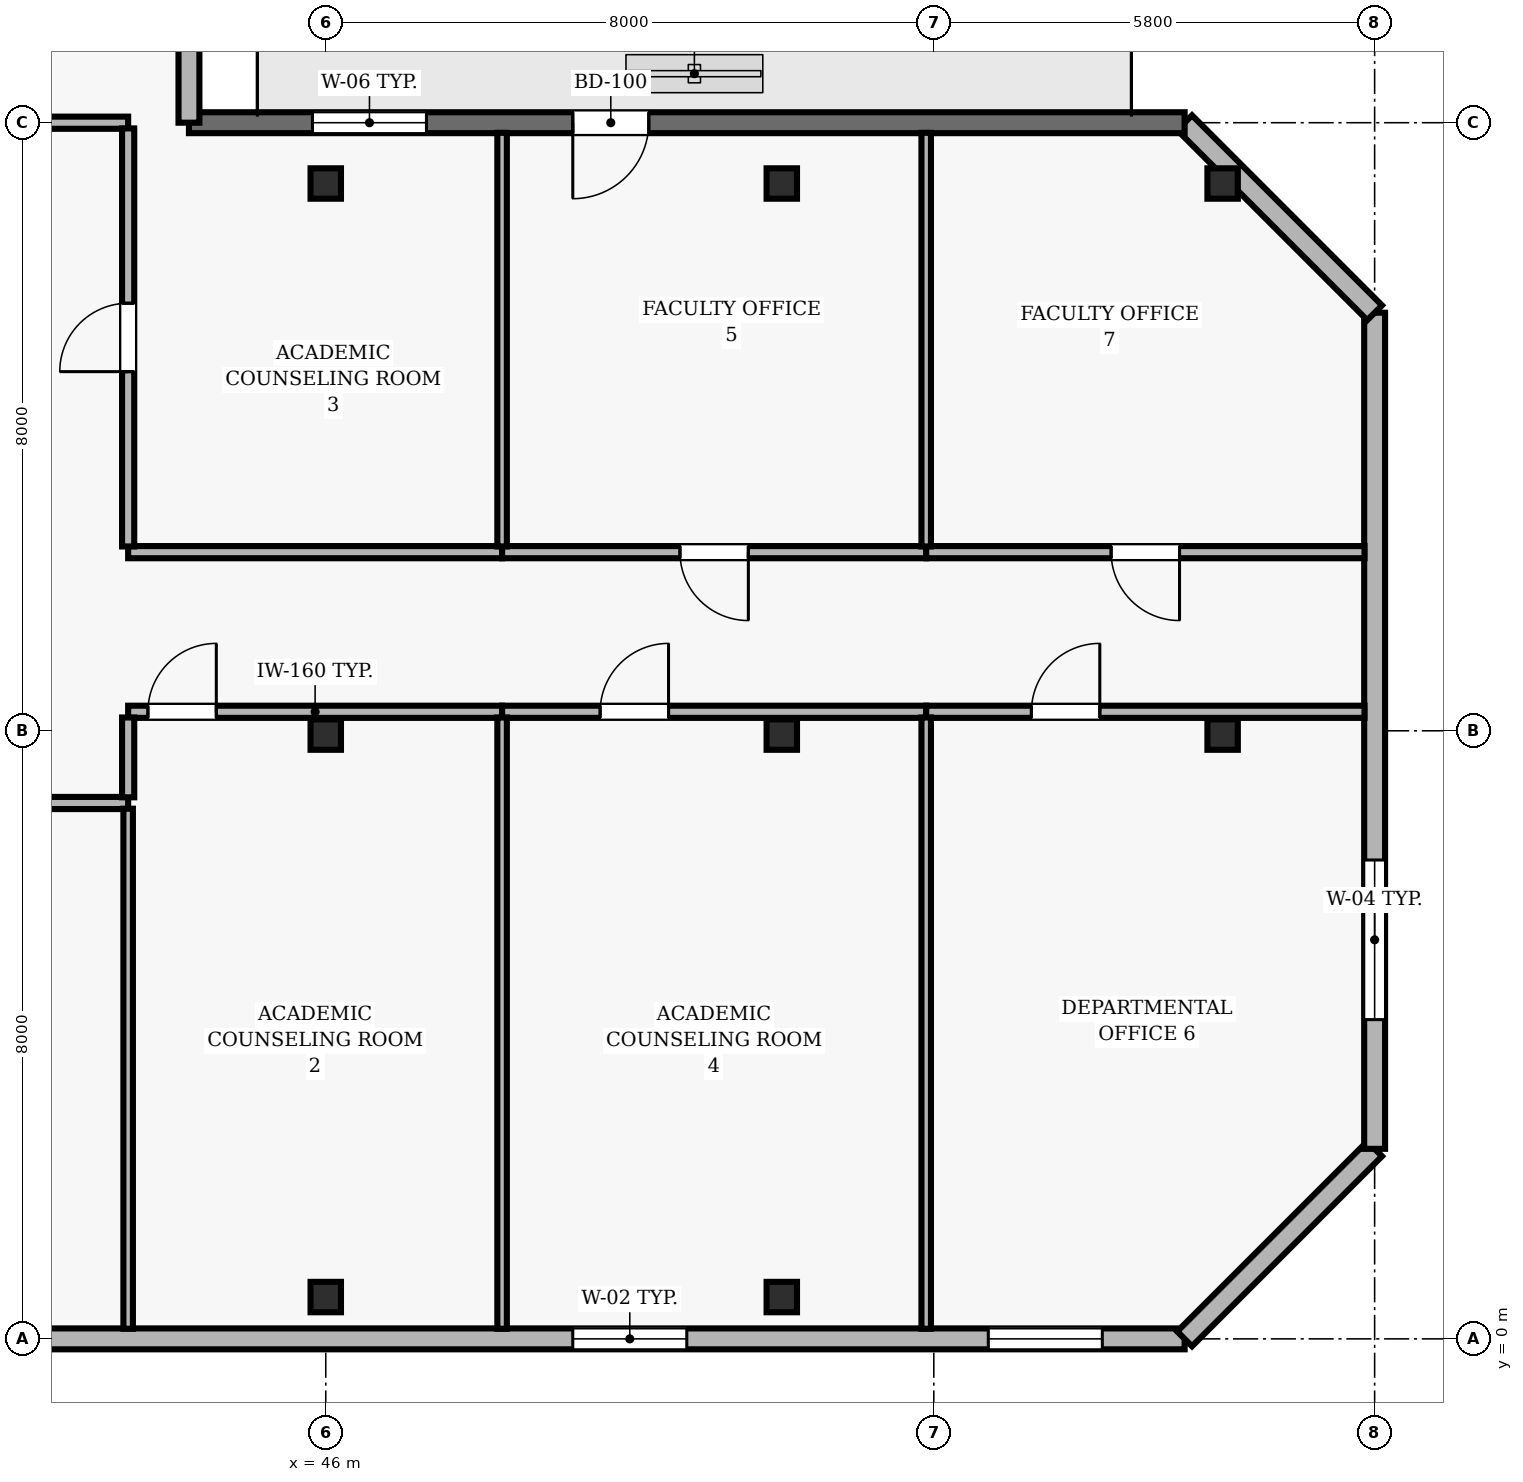
"""IFC4 building model, lengths in metres.
Left out: names, types, materials, properties, quantities, classifications, styles, units other than length and angle.
Written with IfcOpenShell. Run it as: python <this file> out.ifc"""

import sys

from ifc_helpers import new_model, si_unit, direction, frame, frame_2d, origin, origin_2d, place, context, subcontext, project, spatial, rectangle, hollow_rectangle, extrude, element, fill, save


model = new_model("IFC4")
c1 = context("Model", 3, precision=1e-05, world=origin(), true_north=direction((0.0, 1.0)))
c2 = subcontext(c1, "Body", "Model", "MODEL_VIEW")
j1 = project(units=[si_unit("LENGTHUNIT", "METRE"), si_unit("PLANEANGLEUNIT", "RADIAN")], contexts=[c1])
p1 = place(None, origin())
s1 = spatial("IfcSite", under=j1, at=p1, CompositionType="ELEMENT")
p2 = place(p1, origin())
s2 = spatial("IfcBuilding", under=s1, at=p2, CompositionType="ELEMENT")
p3 = place(p2, frame((0.0, 0.0, 298.9)))
s3 = spatial("IfcBuildingStorey", under=s2, at=p3, CompositionType="ELEMENT", Elevation=298.9)
for number, where, z_axis, x_axis in (
    (1, (46.0, 0.55, 0.0), (0.0, 0.0, 1.0), (1.0, 0.0, 0.0)),
    (2, (46.0, 7.95, 0.0), (0.0, 0.0, 1.0), (1.0, 0.0, 0.0)),
    (3, (46.0, 15.2, 0.0), (0.0, 0.0, 1.0), (1.0, 0.0, 0.0)),
    (4, (52.0, 0.55, 0.0), (0.0, 0.0, 1.0), (1.0, 0.0, 0.0)),
    (5, (52.0, 7.95, 0.0), (0.0, 0.0, 1.0), (1.0, 0.0, 0.0)),
    (6, (52.0, 15.2, 0.0), (0.0, 0.0, 1.0), (1.0, 0.0, 0.0)),
    (7, (57.8, 7.95, 0.0), (0.0, 0.0, 1.0), (1.0, 0.0, 0.0)),
    (8, (57.8, 15.2, 0.0), (0.0, 0.0, 1.0), (1.0, 0.0, 0.0)),
):
    element("IfcColumn", number, at=place(p3, frame(where, z_axis=z_axis, x_axis=x_axis)), inside=s3, PredefinedType="COLUMN", context=c2, shape_type="SweptSolid", body=[
        extrude(hollow_rectangle(XDim=0.4, YDim=0.4, WallThickness=0.02, at=origin_2d()), origin(), (0.0, 0.0, 1.0), 3.9),
    ])
p4 = place(p3, frame((24.5, 0.0, 0.0), z_axis=(0.0, 0.0, 1.0), x_axis=(1.0, 0.0, 0.0)))
e9 = element("IfcWall", 9, at=p4, inside=s3, PredefinedType="SOLIDWALL", context=c2, shape_type="SweptSolid", body=[
    extrude(rectangle(XDim=32.8, YDim=0.275, at=frame_2d((16.4, 0.0))), origin(), (0.0, 0.0, 1.0), 3.69),
])
p5 = place(p4, frame((1.983, 0.0, 0.9)))
e10 = element("IfcOpeningElement", 10, at=p5, cuts=e9, PredefinedType="OPENING", context=c2, shape_type="SweptSolid", body=[
    extrude(rectangle(XDim=1.5, YDim=1.6, at=frame_2d((0.75, 0.8))), frame((0.0, 0.147, 0.0), z_axis=(0.0, -1.0, 0.0), x_axis=(1.0, 0.0, 0.0)), (0.0, 0.0, 1.0), 0.295),
])
p6 = place(p4, frame((8.35, 0.0, 0.9)))
e11 = element("IfcOpeningElement", 11, at=p6, cuts=e9, PredefinedType="OPENING", context=c2, shape_type="SweptSolid", body=[
    extrude(rectangle(XDim=1.5, YDim=1.6, at=frame_2d((0.75, 0.8))), frame((0.0, 0.147, 0.0), z_axis=(0.0, -1.0, 0.0), x_axis=(1.0, 0.0, 0.0)), (0.0, 0.0, 1.0), 0.295),
])
p7 = place(p4, frame((24.75, 0.0, 0.9)))
e12 = element("IfcOpeningElement", 12, at=p7, cuts=e9, PredefinedType="OPENING", context=c2, shape_type="SweptSolid", body=[
    extrude(rectangle(XDim=1.5, YDim=1.6, at=frame_2d((0.75, 0.8))), frame((0.0, 0.147, 0.0), z_axis=(0.0, -1.0, 0.0), x_axis=(1.0, 0.0, 0.0)), (0.0, 0.0, 1.0), 0.295),
])
p8 = place(p4, frame((30.217, 0.0, 0.9)))
e13 = element("IfcOpeningElement", 13, at=p8, cuts=e9, PredefinedType="OPENING", context=c2, shape_type="SweptSolid", body=[
    extrude(rectangle(XDim=1.5, YDim=1.6, at=frame_2d((0.75, 0.8))), frame((0.0, 0.147, 0.0), z_axis=(0.0, -1.0, 0.0), x_axis=(1.0, 0.0, 0.0)), (0.0, 0.0, 1.0), 0.295),
])
p9 = place(p3, frame((57.3, 0.0, 0.0), z_axis=(0.0, 0.0, 1.0), x_axis=(0.707106781187, 0.707106781187, 0.0)))
e14 = element("IfcWall", 14, at=p9, inside=s3, PredefinedType="SOLIDWALL", context=c2, shape_type="SweptSolid", body=[
    extrude(rectangle(XDim=3.536, YDim=0.275, at=frame_2d((1.768, 0.0))), origin(), (0.0, 0.0, 1.0), 3.69),
])
p10 = place(p3, frame((59.8, 2.5, 0.0), z_axis=(0.0, 0.0, 1.0), x_axis=(0.0, 1.0, 0.0)))
e15 = element("IfcWall", 15, at=p10, inside=s3, PredefinedType="SOLIDWALL", context=c2, shape_type="SweptSolid", body=[
    extrude(rectangle(XDim=11.0, YDim=0.275, at=frame_2d((5.5, 0.0))), origin(), (0.0, 0.0, 1.0), 3.69),
])
p11 = place(p10, frame((1.7, 0.0, 0.9)))
e16 = element("IfcOpeningElement", 16, at=p11, cuts=e15, PredefinedType="OPENING", context=c2, shape_type="SweptSolid", body=[
    extrude(rectangle(XDim=2.1, YDim=1.6, at=frame_2d((1.05, 0.8))), frame((0.0, 0.147, 0.0), z_axis=(0.0, -1.0, 0.0), x_axis=(1.0, 0.0, 0.0)), (0.0, 0.0, 1.0), 0.295),
])
p12 = place(p3, frame((59.8, 13.5, 0.0), z_axis=(0.0, 0.0, 1.0), x_axis=(-0.707106781187, 0.707106781187, 0.0)))
e17 = element("IfcWall", 17, at=p12, inside=s3, PredefinedType="SOLIDWALL", context=c2, shape_type="SweptSolid", body=[
    extrude(rectangle(XDim=3.536, YDim=0.275, at=frame_2d((1.768, 0.0))), origin(), (0.0, 0.0, 1.0), 3.69),
])
p13 = place(p3, frame((57.3, 16.0, 0.0), z_axis=(0.0, 0.0, 1.0), x_axis=(-1.0, 0.0, 0.0)))
e18 = element("IfcWall", 18, at=p13, inside=s3, PredefinedType="SOLIDWALL", context=c2, shape_type="SweptSolid", body=[
    extrude(rectangle(XDim=13.1, YDim=0.275, at=frame_2d((6.55, 0.0))), origin(), (0.0, 0.0, 1.0), 3.69),
])
p14 = place(p13, frame((7.05, 0.0, 0.0)))
e19 = element("IfcOpeningElement", 19, at=p14, cuts=e18, PredefinedType="OPENING", context=c2, shape_type="SweptSolid", body=[
    extrude(rectangle(XDim=1.0, YDim=2.2, at=frame_2d((0.5, 1.1))), frame((0.0, 0.147, 0.0), z_axis=(0.0, -1.0, 0.0), x_axis=(1.0, 0.0, 0.0)), (0.0, 0.0, 1.0), 0.295),
])
p15 = place(p13, frame((9.975, 0.0, 0.9)))
e20 = element("IfcOpeningElement", 20, at=p15, cuts=e18, PredefinedType="OPENING", context=c2, shape_type="SweptSolid", body=[
    extrude(rectangle(XDim=1.5, YDim=1.8, at=frame_2d((0.75, 0.9))), frame((0.0, 0.147, 0.0), z_axis=(0.0, -1.0, 0.0), x_axis=(1.0, 0.0, 0.0)), (0.0, 0.0, 1.0), 0.295),
])
p16 = place(p3, frame((44.2, 16.0, 0.0), z_axis=(0.0, 0.0, 1.0), x_axis=(0.0, 1.0, 0.0)))
e21 = element("IfcWall", 21, at=p16, inside=s3, PredefinedType="SOLIDWALL", context=c2, shape_type="SweptSolid", body=[
    extrude(rectangle(XDim=4.4, YDim=0.275, at=frame_2d((2.2, 0.0))), origin(), (0.0, 0.0, 1.0), 3.69),
])
p17 = place(p3, frame((38.05, 7.05, 0.0), z_axis=(0.0, 0.0, 1.0), x_axis=(1.0, 0.0, 0.0)))
e22 = element("IfcWall", 22, at=p17, inside=s3, PredefinedType="PARTITIONING", context=c2, shape_type="SweptSolid", body=[
    extrude(rectangle(XDim=5.35, YDim=0.16, at=frame_2d((2.675, 0.0))), origin(), (0.0, 0.0, 1.0), 3.69),
])
p18 = place(p17, frame((2.225, 0.0, 0.0)))
e23 = element("IfcOpeningElement", 23, at=p18, cuts=e22, PredefinedType="OPENING", context=c2, shape_type="SweptSolid", body=[
    extrude(rectangle(XDim=0.9, YDim=2.1, at=frame_2d((0.45, 1.05))), frame((0.0, 0.09, 0.0), z_axis=(0.0, -1.0, 0.0), x_axis=(1.0, 0.0, 0.0)), (0.0, 0.0, 1.0), 0.18),
])
p19 = place(p3, frame((43.4, 8.25, 0.0), z_axis=(0.0, 0.0, 1.0), x_axis=(1.0, 0.0, 0.0)))
e24 = element("IfcWall", 24, at=p19, inside=s3, PredefinedType="PARTITIONING", context=c2, shape_type="SweptSolid", body=[
    extrude(rectangle(XDim=4.92, YDim=0.16, at=frame_2d((2.46, 0.0))), origin(), (0.0, 0.0, 1.0), 3.227),
])
p20 = place(p19, frame((0.26, 0.0, 0.0)))
e25 = element("IfcOpeningElement", 25, at=p20, cuts=e24, PredefinedType="OPENING", context=c2, shape_type="SweptSolid", body=[
    extrude(rectangle(XDim=0.9, YDim=2.1, at=frame_2d((0.45, 1.05))), frame((0.0, 0.09, 0.0), z_axis=(0.0, -1.0, 0.0), x_axis=(1.0, 0.0, 0.0)), (0.0, 0.0, 1.0), 0.18),
])
p21 = place(p3, frame((43.4, 16.0, 0.0), z_axis=(0.0, 0.0, 1.0), x_axis=(-1.0, 0.0, 0.0)))
e26 = element("IfcWall", 26, at=p21, inside=s3, PredefinedType="PARTITIONING", context=c2, shape_type="SweptSolid", body=[
    extrude(rectangle(XDim=5.35, YDim=0.16, at=frame_2d((2.675, 0.0))), origin(), (0.0, 0.0, 1.0), 3.39),
])
p22 = place(p21, frame((2.225, 0.0, 0.0)))
e27 = element("IfcOpeningElement", 27, at=p22, cuts=e26, PredefinedType="OPENING", context=c2, shape_type="SweptSolid", body=[
    extrude(rectangle(XDim=0.9, YDim=2.1, at=frame_2d((0.45, 1.05))), frame((0.0, 0.09, 0.0), z_axis=(0.0, -1.0, 0.0), x_axis=(1.0, 0.0, 0.0)), (0.0, 0.0, 1.0), 0.18),
])
p23 = place(p3, frame((48.32, 8.25, 0.0), z_axis=(0.0, 0.0, 1.0), x_axis=(1.0, 0.0, 0.0)))
e28 = element("IfcWall", 28, at=p23, inside=s3, PredefinedType="PARTITIONING", context=c2, shape_type="SweptSolid", body=[
    extrude(rectangle(XDim=5.58, YDim=0.16, at=frame_2d((2.79, 0.0))), origin(), (0.0, 0.0, 1.0), 3.227),
])
p24 = place(p23, frame((1.29, 0.0, 0.0)))
e29 = element("IfcOpeningElement", 29, at=p24, cuts=e28, PredefinedType="OPENING", context=c2, shape_type="SweptSolid", body=[
    extrude(rectangle(XDim=0.9, YDim=2.1, at=frame_2d((0.45, 1.05))), frame((0.0, 0.09, 0.0), z_axis=(0.0, -1.0, 0.0), x_axis=(1.0, 0.0, 0.0)), (0.0, 0.0, 1.0), 0.18),
])
p25 = place(p3, frame((48.32, 10.35, 0.0), z_axis=(0.0, 0.0, 1.0), x_axis=(-1.0, 0.0, 0.0)))
e30 = element("IfcWall", 30, at=p25, inside=s3, PredefinedType="PARTITIONING", context=c2, shape_type="SweptSolid", body=[
    extrude(rectangle(XDim=4.92, YDim=0.16, at=frame_2d((2.46, 0.0))), origin(), (0.0, 0.0, 1.0), 3.424),
])
p26 = place(p3, frame((53.9, 8.25, 0.0), z_axis=(0.0, 0.0, 1.0), x_axis=(1.0, 0.0, 0.0)))
e31 = element("IfcWall", 31, at=p26, inside=s3, PredefinedType="PARTITIONING", context=c2, shape_type="SweptSolid", body=[
    extrude(rectangle(XDim=5.767, YDim=0.16, at=frame_2d((2.884, 0.0))), origin(), (0.0, 0.0, 1.0), 3.227),
])
p27 = place(p26, frame((1.384, 0.0, 0.0)))
e32 = element("IfcOpeningElement", 32, at=p27, cuts=e31, PredefinedType="OPENING", context=c2, shape_type="SweptSolid", body=[
    extrude(rectangle(XDim=0.9, YDim=2.1, at=frame_2d((0.45, 1.05))), frame((0.0, 0.09, 0.0), z_axis=(0.0, -1.0, 0.0), x_axis=(1.0, 0.0, 0.0)), (0.0, 0.0, 1.0), 0.18),
])
p28 = place(p3, frame((53.9, 10.35, 0.0), z_axis=(0.0, 0.0, 1.0), x_axis=(-1.0, 0.0, 0.0)))
e33 = element("IfcWall", 33, at=p28, inside=s3, PredefinedType="PARTITIONING", context=c2, shape_type="SweptSolid", body=[
    extrude(rectangle(XDim=5.58, YDim=0.16, at=frame_2d((2.79, 0.0))), origin(), (0.0, 0.0, 1.0), 3.424),
])
p29 = place(p28, frame((2.34, 0.0, 0.0)))
e34 = element("IfcOpeningElement", 34, at=p29, cuts=e33, PredefinedType="OPENING", context=c2, shape_type="SweptSolid", body=[
    extrude(rectangle(XDim=0.9, YDim=2.1, at=frame_2d((0.45, 1.05))), frame((0.0, 0.09, 0.0), z_axis=(0.0, -1.0, 0.0), x_axis=(1.0, 0.0, 0.0)), (0.0, 0.0, 1.0), 0.18),
])
p30 = place(p3, frame((59.667, 10.35, 0.0), z_axis=(0.0, 0.0, 1.0), x_axis=(-1.0, 0.0, 0.0)))
e35 = element("IfcWall", 35, at=p30, inside=s3, PredefinedType="PARTITIONING", context=c2, shape_type="SweptSolid", body=[
    extrude(rectangle(XDim=5.767, YDim=0.16, at=frame_2d((2.884, 0.0))), origin(), (0.0, 0.0, 1.0), 3.424),
])
p31 = place(p30, frame((2.434, 0.0, 0.0)))
e36 = element("IfcOpeningElement", 36, at=p31, cuts=e35, PredefinedType="OPENING", context=c2, shape_type="SweptSolid", body=[
    extrude(rectangle(XDim=0.9, YDim=2.1, at=frame_2d((0.45, 1.05))), frame((0.0, 0.09, 0.0), z_axis=(0.0, -1.0, 0.0), x_axis=(1.0, 0.0, 0.0)), (0.0, 0.0, 1.0), 0.18),
])
p32 = place(p3, frame((43.4, 0.133, 0.0), z_axis=(0.0, 0.0, 1.0), x_axis=(0.0, 1.0, 0.0)))
e37 = element("IfcWall", 37, at=p32, inside=s3, PredefinedType="PARTITIONING", context=c2, shape_type="SweptSolid", body=[
    extrude(rectangle(XDim=6.842, YDim=0.125, at=frame_2d((3.421, 0.0))), origin(), (0.0, 0.0, 1.0), 3.69),
])
p33 = place(p3, frame((43.4, 7.125, 0.0), z_axis=(0.0, 0.0, 1.0), x_axis=(0.0, 1.0, 0.0)))
e38 = element("IfcWall", 38, at=p33, inside=s3, PredefinedType="PARTITIONING", context=c2, shape_type="SweptSolid", body=[
    extrude(rectangle(XDim=1.05, YDim=0.16, at=frame_2d((0.525, 0.0))), origin(), (0.0, 0.0, 1.0), 3.69),
])
p34 = place(p3, frame((43.4, 10.425, 0.0), z_axis=(0.0, 0.0, 1.0), x_axis=(0.0, 1.0, 0.0)))
e39 = element("IfcWall", 39, at=p34, inside=s3, PredefinedType="PARTITIONING", context=c2, shape_type="SweptSolid", body=[
    extrude(rectangle(XDim=5.5, YDim=0.16, at=frame_2d((2.75, 0.0))), origin(), (0.0, 0.0, 1.0), 3.69),
])
p35 = place(p34, frame((2.3, 0.0, 0.0)))
e40 = element("IfcOpeningElement", 40, at=p35, cuts=e39, PredefinedType="OPENING", context=c2, shape_type="SweptSolid", body=[
    extrude(rectangle(XDim=0.9, YDim=2.1, at=frame_2d((0.45, 1.05))), frame((0.0, 0.09, 0.0), z_axis=(0.0, -1.0, 0.0), x_axis=(1.0, 0.0, 0.0)), (0.0, 0.0, 1.0), 0.18),
])
p36 = place(p3, frame((48.32, 0.133, 0.0), z_axis=(0.0, 0.0, 1.0), x_axis=(0.0, 1.0, 0.0)))
e41 = element("IfcWall", 41, at=p36, inside=s3, PredefinedType="PARTITIONING", context=c2, shape_type="SweptSolid", body=[
    extrude(rectangle(XDim=8.042, YDim=0.125, at=frame_2d((4.021, 0.0))), origin(), (0.0, 0.0, 1.0), 3.69),
])
p37 = place(p3, frame((48.32, 10.425, 0.0), z_axis=(0.0, 0.0, 1.0), x_axis=(0.0, 1.0, 0.0)))
e42 = element("IfcWall", 42, at=p37, inside=s3, PredefinedType="PARTITIONING", context=c2, shape_type="SweptSolid", body=[
    extrude(rectangle(XDim=5.442, YDim=0.125, at=frame_2d((2.721, 0.0))), origin(), (0.0, 0.0, 1.0), 3.69),
])
p38 = place(p3, frame((53.9, 0.133, 0.0), z_axis=(0.0, 0.0, 1.0), x_axis=(0.0, 1.0, 0.0)))
e43 = element("IfcWall", 43, at=p38, inside=s3, PredefinedType="PARTITIONING", context=c2, shape_type="SweptSolid", body=[
    extrude(rectangle(XDim=8.042, YDim=0.125, at=frame_2d((4.021, 0.0))), origin(), (0.0, 0.0, 1.0), 3.69),
])
p39 = place(p3, frame((53.9, 10.425, 0.0), z_axis=(0.0, 0.0, 1.0), x_axis=(0.0, 1.0, 0.0)))
e44 = element("IfcWall", 44, at=p39, inside=s3, PredefinedType="PARTITIONING", context=c2, shape_type="SweptSolid", body=[
    extrude(rectangle(XDim=5.442, YDim=0.125, at=frame_2d((2.721, 0.0))), origin(), (0.0, 0.0, 1.0), 3.69),
])
p40 = place(p7, origin())
e45 = element("IfcWindow", 45, at=p40, inside=s3, PartitioningType="SINGLE_PANEL", PredefinedType="WINDOW", context=c2, shape_type="SweptSolid", body=[
    extrude(rectangle(XDim=1.5, YDim=1.6, at=frame_2d((0.75, 0.8))), frame((0.0, 0.03, 0.0), z_axis=(0.0, -1.0, 0.0), x_axis=(1.0, 0.0, 0.0)), (0.0, 0.0, 1.0), 0.06),
])
fill(e12, e45)
p41 = place(p8, origin())
e46 = element("IfcWindow", 46, at=p41, inside=s3, PartitioningType="SINGLE_PANEL", PredefinedType="WINDOW", context=c2, shape_type="SweptSolid", body=[
    extrude(rectangle(XDim=1.5, YDim=1.6, at=frame_2d((0.75, 0.8))), frame((0.0, 0.03, 0.0), z_axis=(0.0, -1.0, 0.0), x_axis=(1.0, 0.0, 0.0)), (0.0, 0.0, 1.0), 0.06),
])
fill(e13, e46)
p42 = place(p11, origin())
e47 = element("IfcWindow", 47, at=p42, inside=s3, PartitioningType="SINGLE_PANEL", PredefinedType="WINDOW", context=c2, shape_type="SweptSolid", body=[
    extrude(rectangle(XDim=2.1, YDim=1.6, at=frame_2d((1.05, 0.8))), frame((0.0, 0.03, 0.0), z_axis=(0.0, -1.0, 0.0), x_axis=(1.0, 0.0, 0.0)), (0.0, 0.0, 1.0), 0.06),
])
fill(e16, e47)
p43 = place(p14, origin())
e48 = element("IfcDoor", 48, at=p43, inside=s3, OperationType="SINGLE_SWING_RIGHT", PredefinedType="DOOR", context=c2, shape_type="SweptSolid", body=[
    extrude(rectangle(XDim=1.0, YDim=2.2, at=frame_2d((0.5, 1.1))), frame((0.0, 0.025, 0.0), z_axis=(0.0, -1.0, 0.0), x_axis=(1.0, 0.0, 0.0)), (0.0, 0.0, 1.0), 0.05),
])
fill(e19, e48)
p44 = place(p15, origin())
e49 = element("IfcWindow", 49, at=p44, inside=s3, PartitioningType="SINGLE_PANEL", PredefinedType="WINDOW", context=c2, shape_type="SweptSolid", body=[
    extrude(rectangle(XDim=1.5, YDim=1.8, at=frame_2d((0.75, 0.9))), frame((0.0, 0.03, 0.0), z_axis=(0.0, -1.0, 0.0), x_axis=(1.0, 0.0, 0.0)), (0.0, 0.0, 1.0), 0.06),
])
fill(e20, e49)
p45 = place(p20, origin())
e50 = element("IfcDoor", 50, at=p45, inside=s3, OperationType="SINGLE_SWING_RIGHT", PredefinedType="DOOR", context=c2, shape_type="SweptSolid", body=[
    extrude(rectangle(XDim=0.9, YDim=2.1, at=frame_2d((0.45, 1.05))), frame((0.0, 0.025, 0.0), z_axis=(0.0, -1.0, 0.0), x_axis=(1.0, 0.0, 0.0)), (0.0, 0.0, 1.0), 0.05),
])
fill(e25, e50)
p46 = place(p35, origin())
e51 = element("IfcDoor", 51, at=p46, inside=s3, OperationType="SINGLE_SWING_LEFT", PredefinedType="DOOR", context=c2, shape_type="SweptSolid", body=[
    extrude(rectangle(XDim=0.9, YDim=2.1, at=frame_2d((0.45, 1.05))), frame((0.0, 0.025, 0.0), z_axis=(0.0, -1.0, 0.0), x_axis=(1.0, 0.0, 0.0)), (0.0, 0.0, 1.0), 0.05),
])
fill(e40, e51)
p47 = place(p24, origin())
e52 = element("IfcDoor", 52, at=p47, inside=s3, OperationType="SINGLE_SWING_RIGHT", PredefinedType="DOOR", context=c2, shape_type="SweptSolid", body=[
    extrude(rectangle(XDim=0.9, YDim=2.1, at=frame_2d((0.45, 1.05))), frame((0.0, 0.025, 0.0), z_axis=(0.0, -1.0, 0.0), x_axis=(1.0, 0.0, 0.0)), (0.0, 0.0, 1.0), 0.05),
])
fill(e29, e52)
p48 = place(p29, origin())
e53 = element("IfcDoor", 53, at=p48, inside=s3, OperationType="SINGLE_SWING_LEFT", PredefinedType="DOOR", context=c2, shape_type="SweptSolid", body=[
    extrude(rectangle(XDim=0.9, YDim=2.1, at=frame_2d((0.45, 1.05))), frame((0.0, 0.025, 0.0), z_axis=(0.0, -1.0, 0.0), x_axis=(1.0, 0.0, 0.0)), (0.0, 0.0, 1.0), 0.05),
])
fill(e34, e53)
p49 = place(p27, origin())
e54 = element("IfcDoor", 54, at=p49, inside=s3, OperationType="SINGLE_SWING_RIGHT", PredefinedType="DOOR", context=c2, shape_type="SweptSolid", body=[
    extrude(rectangle(XDim=0.9, YDim=2.1, at=frame_2d((0.45, 1.05))), frame((0.0, 0.025, 0.0), z_axis=(0.0, -1.0, 0.0), x_axis=(1.0, 0.0, 0.0)), (0.0, 0.0, 1.0), 0.05),
])
fill(e32, e54)
p50 = place(p31, origin())
e55 = element("IfcDoor", 55, at=p50, inside=s3, OperationType="SINGLE_SWING_LEFT", PredefinedType="DOOR", context=c2, shape_type="SweptSolid", body=[
    extrude(rectangle(XDim=0.9, YDim=2.1, at=frame_2d((0.45, 1.05))), frame((0.0, 0.025, 0.0), z_axis=(0.0, -1.0, 0.0), x_axis=(1.0, 0.0, 0.0)), (0.0, 0.0, 1.0), 0.05),
])
fill(e36, e55)
save(model, sys.argv[1])
